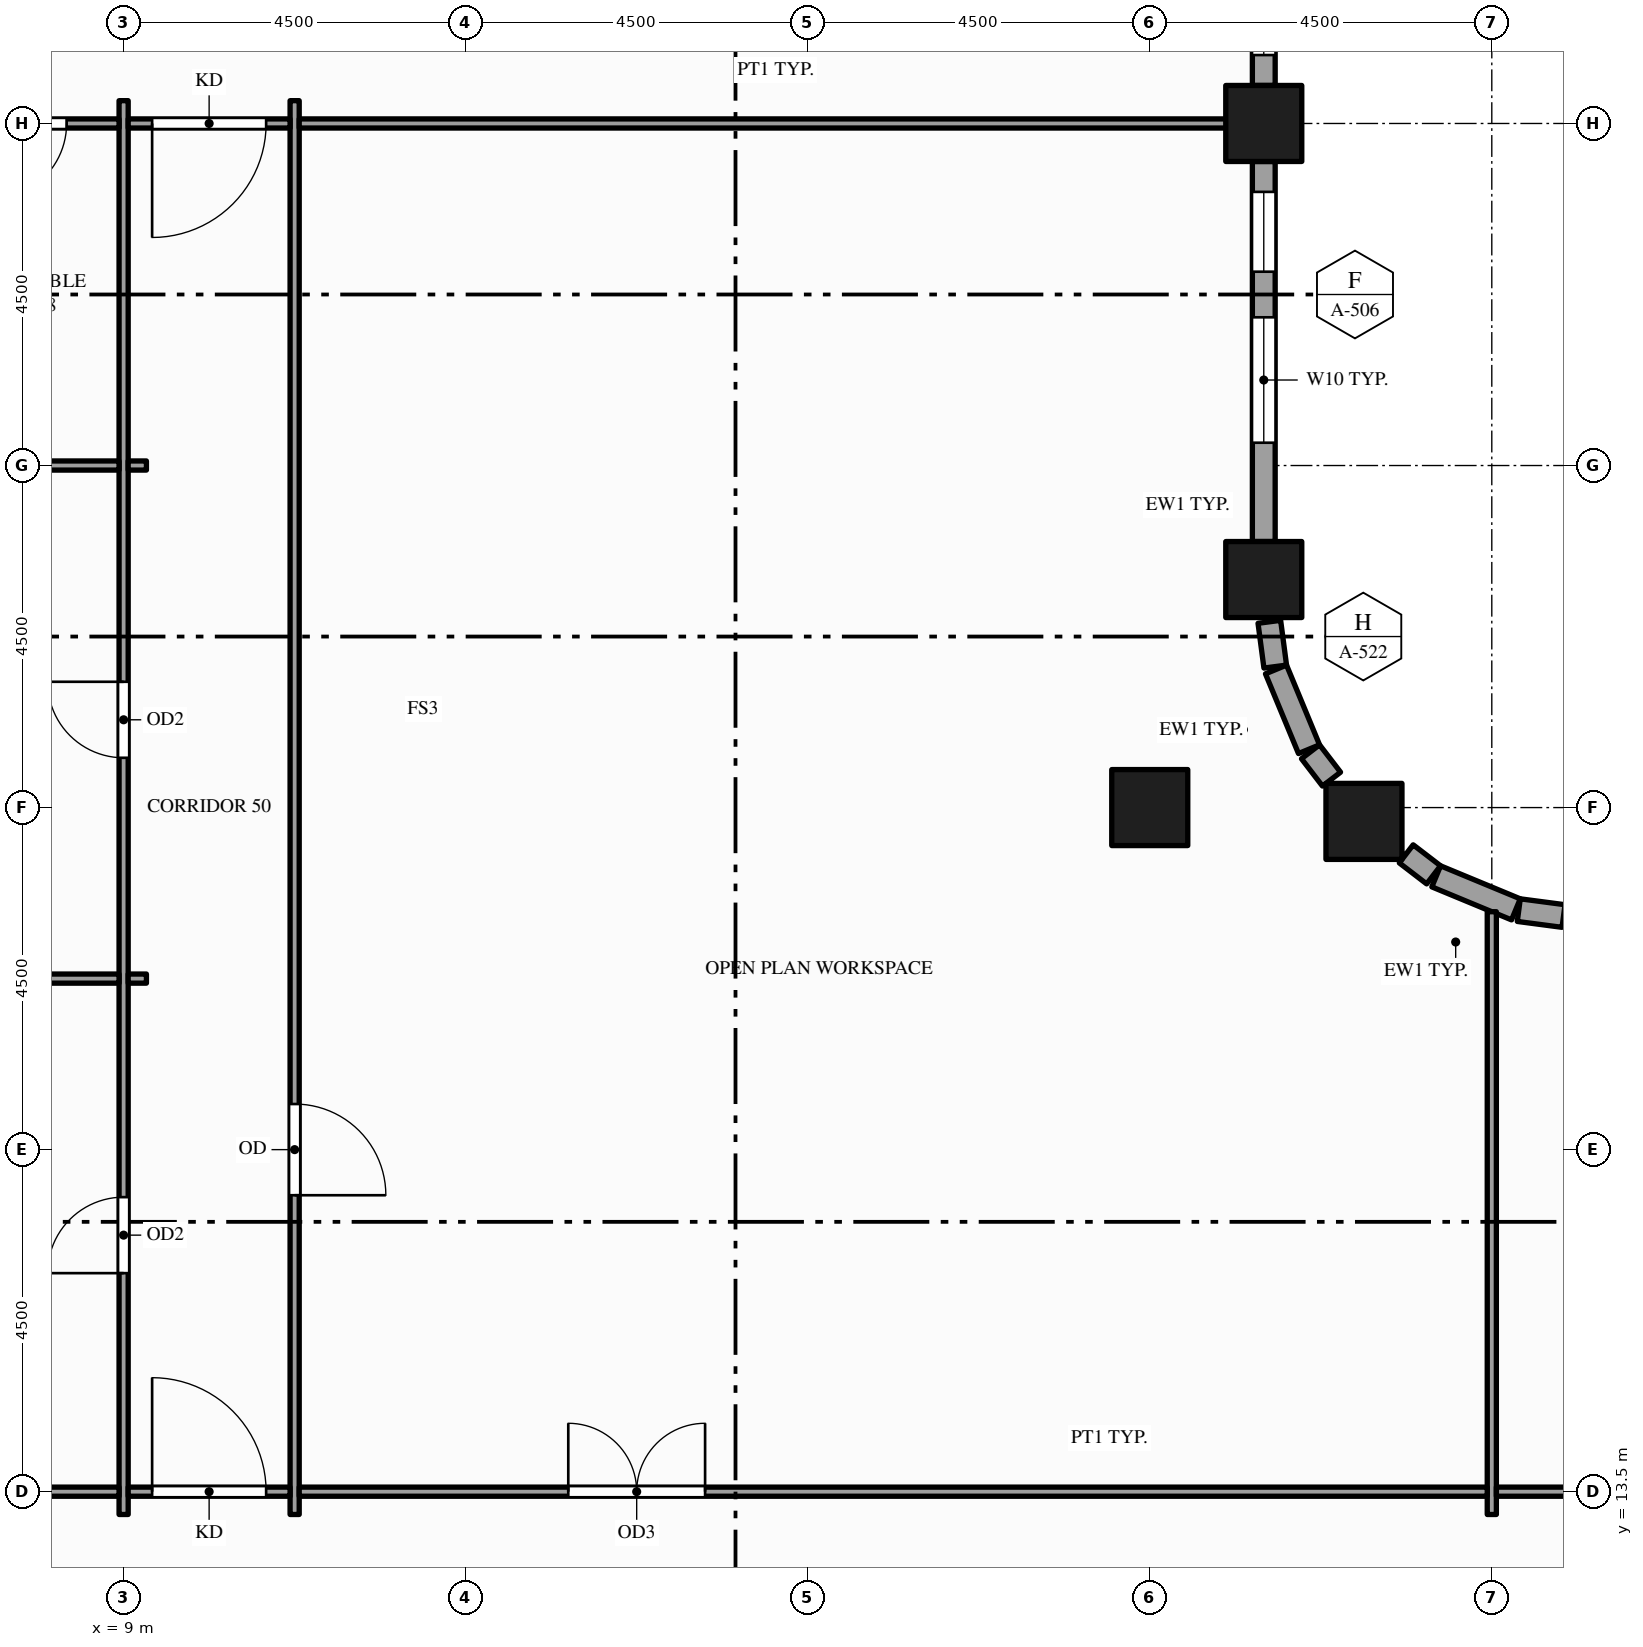
"""IFC4 building model, lengths in metres.
Left out: names, types, materials, properties, quantities, classifications, styles, units other than length and angle.
Written with IfcOpenShell. Run it as: python <this file> out.ifc"""

import sys

from ifc_helpers import new_model, si_unit, direction, frame, frame_2d, origin, origin_2d, place, context, subcontext, project, spatial, rectangle, hollow_rectangle, extrude, element, fill, save


model = new_model("IFC4")
c1 = context("Model", 3, precision=1e-05, world=origin(), true_north=direction((0.0, 1.0)))
c2 = subcontext(c1, "Body", "Model", "MODEL_VIEW")
j1 = project(units=[si_unit("LENGTHUNIT", "METRE"), si_unit("PLANEANGLEUNIT", "RADIAN")], contexts=[c1])
p1 = place(None, origin())
s1 = spatial("IfcSite", under=j1, at=p1, CompositionType="ELEMENT")
p2 = place(p1, origin())
s2 = spatial("IfcBuilding", under=s1, at=p2, CompositionType="ELEMENT")
p3 = place(p2, frame((0.0, 0.0, 123.0)))
s3 = spatial("IfcBuildingStorey", under=s2, at=p3, CompositionType="ELEMENT", Elevation=123.0)
for number, where, z_axis, x_axis in (
    (1, (22.5, 22.5, -0.15), (0.0, 0.0, 1.0), (1.0, 0.0, 0.0)),
    (2, (24.0, 25.5, -0.15), (0.0, 0.0, 1.0), (1.0, 0.0, 0.0)),
    (3, (24.0, 31.5, -0.15), (0.0, 0.0, 1.0), (1.0, 0.0, 0.0)),
    (4, (25.318, 22.318, -0.15), (0.0, 0.0, 1.0), (1.0, 0.0, 0.0)),
):
    element("IfcColumn", number, at=place(p3, frame(where, z_axis=z_axis, x_axis=x_axis)), inside=s3, PredefinedType="COLUMN", context=c2, shape_type="SweptSolid", body=[
        extrude(hollow_rectangle(XDim=1.0, YDim=1.0, WallThickness=0.05, at=origin_2d()), origin(), (0.0, 0.0, 1.0), 4.0),
    ])
p4 = place(p3, frame((27.944, 21.073, 0.0), z_axis=(0.0, 0.0, 1.0), x_axis=(-0.991420685839, 0.130709692412, 0.0)))
e5 = element("IfcWall", 5, at=p4, inside=s3, PredefinedType="STANDARD", context=c2, shape_type="SweptSolid", body=[
    extrude(rectangle(XDim=0.594, YDim=0.3, at=frame_2d((0.297, 0.0))), origin(), (0.0, 0.0, 1.0), 3.154),
])
p5 = place(p3, frame((27.317, 21.161, 0.0), z_axis=(0.0, 0.0, 1.0), x_axis=(-0.923914616768, 0.382598720491, 0.0)))
e6 = element("IfcWall", 6, at=p5, inside=s3, PredefinedType="STANDARD", context=c2, shape_type="SweptSolid", body=[
    extrude(rectangle(XDim=1.135, YDim=0.3, at=frame_2d((0.568, 0.0))), origin(), (0.0, 0.0, 1.0), 2.938),
])
p6 = place(p3, frame((26.234, 21.615, 0.0), z_axis=(0.0, 0.0, 1.0), x_axis=(-0.793563062559, 0.608488016104, 0.0)))
e7 = element("IfcWall", 7, at=p6, inside=s3, PredefinedType="STANDARD", context=c2, shape_type="SweptSolid", body=[
    extrude(rectangle(XDim=0.454, YDim=0.3, at=frame_2d((0.227, 0.0))), origin(), (0.0, 0.0, 1.0), 3.154),
])
p7 = place(p3, frame((24.891, 22.874, 0.0), z_axis=(0.0, 0.0, 1.0), x_axis=(-0.608488016104, 0.793563062559, 0.0)))
e8 = element("IfcWall", 8, at=p7, inside=s3, PredefinedType="STANDARD", context=c2, shape_type="SweptSolid", body=[
    extrude(rectangle(XDim=0.454, YDim=0.3, at=frame_2d((0.227, 0.0))), origin(), (0.0, 0.0, 1.0), 2.76),
])
p8 = place(p3, frame((24.595, 23.268, 0.0), z_axis=(0.0, 0.0, 1.0), x_axis=(-0.382598720491, 0.923914616768, 0.0)))
e9 = element("IfcWall", 9, at=p8, inside=s3, PredefinedType="STANDARD", context=c2, shape_type="SweptSolid", body=[
    extrude(rectangle(XDim=1.135, YDim=0.3, at=frame_2d((0.568, 0.0))), origin(), (0.0, 0.0, 1.0), 3.154),
])
p9 = place(p3, frame((24.151, 24.355, 0.0), z_axis=(0.0, 0.0, 1.0), x_axis=(-0.130709692412, 0.991420685839, 0.0)))
e10 = element("IfcWall", 10, at=p9, inside=s3, PredefinedType="STANDARD", context=c2, shape_type="SweptSolid", body=[
    extrude(rectangle(XDim=0.594, YDim=0.3, at=frame_2d((0.297, 0.0))), origin(), (0.0, 0.0, 1.0), 3.154),
])
p10 = place(p3, frame((24.0, 26.0, 0.0), z_axis=(0.0, 0.0, 1.0), x_axis=(0.0, 1.0, 0.0)))
e11 = element("IfcWall", 11, at=p10, inside=s3, PredefinedType="STANDARD", context=c2, shape_type="SweptSolid", body=[
    extrude(rectangle(XDim=5.0, YDim=0.3, at=frame_2d((2.5, 0.0))), origin(), (0.0, 0.0, 1.0), 3.154),
])
p11 = place(p10, frame((1.3, 0.0, 0.9)))
e12 = element("IfcOpeningElement", 12, at=p11, cuts=e11, PredefinedType="OPENING", context=c2, shape_type="SweptSolid", body=[
    extrude(rectangle(XDim=1.65, YDim=2.0, at=frame_2d((0.825, 1.0))), frame((0.0, 0.16, 0.0), z_axis=(0.0, -1.0, 0.0), x_axis=(1.0, 0.0, 0.0)), (0.0, 0.0, 1.0), 0.32),
])
p12 = place(p10, frame((3.55, 0.0, 0.9)))
e13 = element("IfcOpeningElement", 13, at=p12, cuts=e11, PredefinedType="OPENING", context=c2, shape_type="SweptSolid", body=[
    extrude(rectangle(XDim=1.05, YDim=2.0, at=frame_2d((0.525, 1.0))), frame((0.0, 0.16, 0.0), z_axis=(0.0, -1.0, 0.0), x_axis=(1.0, 0.0, 0.0)), (0.0, 0.0, 1.0), 0.32),
])
p13 = place(p3, frame((24.0, 32.0, 0.0), z_axis=(0.0, 0.0, 1.0), x_axis=(0.0, 1.0, 0.0)))
e14 = element("IfcWall", 14, at=p13, inside=s3, PredefinedType="STANDARD", context=c2, shape_type="SweptSolid", body=[
    extrude(rectangle(XDim=3.5, YDim=0.3, at=frame_2d((1.75, 0.0))), origin(), (0.0, 0.0, 1.0), 3.154),
])
p14 = place(p13, frame((0.4, 0.0, 0.9)))
e15 = element("IfcOpeningElement", 15, at=p14, cuts=e14, PredefinedType="OPENING", context=c2, shape_type="SweptSolid", body=[
    extrude(rectangle(XDim=1.05, YDim=2.0, at=frame_2d((0.525, 1.0))), frame((0.0, 0.16, 0.0), z_axis=(0.0, -1.0, 0.0), x_axis=(1.0, 0.0, 0.0)), (0.0, 0.0, 1.0), 0.32),
])
p15 = place(p13, frame((2.05, 0.0, 0.9)))
e16 = element("IfcOpeningElement", 16, at=p15, cuts=e14, PredefinedType="OPENING", context=c2, shape_type="SweptSolid", body=[
    extrude(rectangle(XDim=1.05, YDim=2.0, at=frame_2d((0.525, 1.0))), frame((0.0, 0.16, 0.0), z_axis=(0.0, -1.0, 0.0), x_axis=(1.0, 0.0, 0.0)), (0.0, 0.0, 1.0), 0.32),
])
p16 = place(p3, frame((9.0, 13.2, 0.0), z_axis=(0.0, 0.0, 1.0), x_axis=(0.0, 1.0, 0.0)))
e17 = element("IfcWall", 17, at=p16, inside=s3, PredefinedType="PARTITIONING", context=c2, shape_type="SweptSolid", body=[
    extrude(rectangle(XDim=18.6, YDim=0.12, at=frame_2d((9.3, 0.0))), origin(), (0.0, 0.0, 1.0), 2.6),
])
p17 = place(p16, frame((3.175, 0.0, 0.0)))
e18 = element("IfcOpeningElement", 18, at=p17, cuts=e17, PredefinedType="OPENING", context=c2, shape_type="SweptSolid", body=[
    extrude(rectangle(XDim=1.0, YDim=2.1, at=frame_2d((0.5, 1.05))), frame((0.0, 0.07, 0.0), z_axis=(0.0, -1.0, 0.0), x_axis=(1.0, 0.0, 0.0)), (0.0, 0.0, 1.0), 0.14),
])
p18 = place(p16, frame((9.955, 0.0, 0.0)))
e19 = element("IfcOpeningElement", 19, at=p18, cuts=e17, PredefinedType="OPENING", context=c2, shape_type="SweptSolid", body=[
    extrude(rectangle(XDim=1.0, YDim=2.1, at=frame_2d((0.5, 1.05))), frame((0.0, 0.07, 0.0), z_axis=(0.0, -1.0, 0.0), x_axis=(1.0, 0.0, 0.0)), (0.0, 0.0, 1.0), 0.14),
])
p19 = place(p3, frame((11.25, 13.2, 0.0), z_axis=(0.0, 0.0, 1.0), x_axis=(0.0, 1.0, 0.0)))
e20 = element("IfcWall", 20, at=p19, inside=s3, PredefinedType="PARTITIONING", context=c2, shape_type="SweptSolid", body=[
    extrude(rectangle(XDim=18.6, YDim=0.12, at=frame_2d((9.3, 0.0))), origin(), (0.0, 0.0, 1.0), 2.6),
])
p20 = place(p19, frame((4.2, 0.0, 0.0)))
e21 = element("IfcOpeningElement", 21, at=p20, cuts=e20, PredefinedType="OPENING", context=c2, shape_type="SweptSolid", body=[
    extrude(rectangle(XDim=1.2, YDim=2.1, at=frame_2d((0.6, 1.05))), frame((0.0, 0.07, 0.0), z_axis=(0.0, -1.0, 0.0), x_axis=(1.0, 0.0, 0.0)), (0.0, 0.0, 1.0), 0.14),
])
p21 = place(p3, frame((27.0, 13.2, 0.0), z_axis=(0.0, 0.0, 1.0), x_axis=(0.0, 1.0, 0.0)))
e22 = element("IfcWall", 22, at=p21, inside=s3, PredefinedType="PARTITIONING", context=c2, shape_type="SweptSolid", body=[
    extrude(rectangle(XDim=7.93, YDim=0.12, at=frame_2d((3.965, 0.0))), origin(), (0.0, 0.0, 1.0), 2.938),
])
p22 = place(p3, frame((0.15, 13.5, 0.0), z_axis=(0.0, 0.0, 1.0), x_axis=(1.0, 0.0, 0.0)))
e23 = element("IfcWall", 23, at=p22, inside=s3, PredefinedType="PARTITIONING", context=c2, shape_type="SweptSolid", body=[
    extrude(rectangle(XDim=8.79, YDim=0.12, at=frame_2d((4.395, 0.0))), origin(), (0.0, 0.0, 1.0), 2.938),
])
p23 = place(p3, frame((9.06, 13.5, 0.0), z_axis=(0.0, 0.0, 1.0), x_axis=(1.0, 0.0, 0.0)))
e24 = element("IfcWall", 24, at=p23, inside=s3, PredefinedType="PARTITIONING", context=c2, shape_type="SweptSolid", body=[
    extrude(rectangle(XDim=2.13, YDim=0.12, at=frame_2d((1.065, 0.0))), origin(), (0.0, 0.0, 1.0), 2.938),
])
p24 = place(p23, frame((0.315, 0.0, 0.0)))
e25 = element("IfcOpeningElement", 25, at=p24, cuts=e24, PredefinedType="OPENING", context=c2, shape_type="SweptSolid", body=[
    extrude(rectangle(XDim=1.5, YDim=2.1, at=frame_2d((0.75, 1.05))), frame((0.0, 0.07, 0.0), z_axis=(0.0, -1.0, 0.0), x_axis=(1.0, 0.0, 0.0)), (0.0, 0.0, 1.0), 0.14),
])
p25 = place(p3, frame((11.31, 13.5, 0.0), z_axis=(0.0, 0.0, 1.0), x_axis=(1.0, 0.0, 0.0)))
e26 = element("IfcWall", 26, at=p25, inside=s3, PredefinedType="PARTITIONING", context=c2, shape_type="SweptSolid", body=[
    extrude(rectangle(XDim=15.63, YDim=0.12, at=frame_2d((7.815, 0.0))), origin(), (0.0, 0.0, 1.0), 2.76),
])
p26 = place(p25, frame((3.54, 0.0, 0.0)))
e27 = element("IfcOpeningElement", 27, at=p26, cuts=e26, PredefinedType="OPENING", context=c2, shape_type="SweptSolid", body=[
    extrude(rectangle(XDim=1.8, YDim=2.1, at=frame_2d((0.9, 1.05))), frame((0.0, 0.07, 0.0), z_axis=(0.0, -1.0, 0.0), x_axis=(1.0, 0.0, 0.0)), (0.0, 0.0, 1.0), 0.14),
])
p27 = place(p3, frame((27.06, 13.5, 0.0), z_axis=(0.0, 0.0, 1.0), x_axis=(1.0, 0.0, 0.0)))
e28 = element("IfcWall", 28, at=p27, inside=s3, PredefinedType="PARTITIONING", context=c2, shape_type="SweptSolid", body=[
    extrude(rectangle(XDim=4.38, YDim=0.12, at=frame_2d((2.19, 0.0))), origin(), (0.0, 0.0, 1.0), 2.938),
])
p28 = place(p27, frame((1.74, 0.0, 0.0)))
e29 = element("IfcOpeningElement", 29, at=p28, cuts=e28, PredefinedType="OPENING", context=c2, shape_type="SweptSolid", body=[
    extrude(rectangle(XDim=0.9, YDim=2.1, at=frame_2d((0.45, 1.05))), frame((0.0, 0.07, 0.0), z_axis=(0.0, -1.0, 0.0), x_axis=(1.0, 0.0, 0.0)), (0.0, 0.0, 1.0), 0.14),
])
p29 = place(p3, frame((0.15, 20.25, 0.0), z_axis=(0.0, 0.0, 1.0), x_axis=(1.0, 0.0, 0.0)))
e30 = element("IfcWall", 30, at=p29, inside=s3, PredefinedType="PARTITIONING", context=c2, shape_type="SweptSolid", body=[
    extrude(rectangle(XDim=8.79, YDim=0.12, at=frame_2d((4.395, 0.0))), origin(), (0.0, 0.0, 1.0), 2.938),
])
p30 = place(p3, frame((9.06, 20.25, 0.0), z_axis=(0.0, 0.0, 1.0), x_axis=(1.0, 0.0, 0.0)))
e31 = element("IfcWall", 31, at=p30, inside=s3, PredefinedType="PARTITIONING", context=c2, shape_type="SweptSolid", body=[
    extrude(rectangle(XDim=0.24, YDim=0.12, at=frame_2d((0.12, 0.0))), origin(), (0.0, 0.0, 1.0), 2.938),
])
p31 = place(p3, frame((6.56, 27.0, 0.0), z_axis=(0.0, 0.0, 1.0), x_axis=(1.0, 0.0, 0.0)))
e32 = element("IfcWall", 32, at=p31, inside=s3, PredefinedType="PARTITIONING", context=c2, shape_type="SweptSolid", body=[
    extrude(rectangle(XDim=2.38, YDim=0.12, at=frame_2d((1.19, 0.0))), origin(), (0.0, 0.0, 1.0), 2.938),
])
p32 = place(p3, frame((9.06, 27.0, 0.0), z_axis=(0.0, 0.0, 1.0), x_axis=(1.0, 0.0, 0.0)))
e33 = element("IfcWall", 33, at=p32, inside=s3, PredefinedType="PARTITIONING", context=c2, shape_type="SweptSolid", body=[
    extrude(rectangle(XDim=0.24, YDim=0.12, at=frame_2d((0.12, 0.0))), origin(), (0.0, 0.0, 1.0), 2.938),
])
p33 = place(p3, frame((6.56, 31.5, 0.0), z_axis=(0.0, 0.0, 1.0), x_axis=(1.0, 0.0, 0.0)))
e34 = element("IfcWall", 34, at=p33, inside=s3, PredefinedType="PARTITIONING", context=c2, shape_type="SweptSolid", body=[
    extrude(rectangle(XDim=2.38, YDim=0.12, at=frame_2d((1.19, 0.0))), origin(), (0.0, 0.0, 1.0), 2.938),
])
p34 = place(p33, frame((0.69, 0.0, 0.0)))
e35 = element("IfcOpeningElement", 35, at=p34, cuts=e34, PredefinedType="OPENING", context=c2, shape_type="SweptSolid", body=[
    extrude(rectangle(XDim=1.0, YDim=2.1, at=frame_2d((0.5, 1.05))), frame((0.0, 0.07, 0.0), z_axis=(0.0, -1.0, 0.0), x_axis=(1.0, 0.0, 0.0)), (0.0, 0.0, 1.0), 0.14),
])
p35 = place(p3, frame((9.06, 31.5, 0.0), z_axis=(0.0, 0.0, 1.0), x_axis=(1.0, 0.0, 0.0)))
e36 = element("IfcWall", 36, at=p35, inside=s3, PredefinedType="PARTITIONING", context=c2, shape_type="SweptSolid", body=[
    extrude(rectangle(XDim=2.13, YDim=0.12, at=frame_2d((1.065, 0.0))), origin(), (0.0, 0.0, 1.0), 2.938),
])
p36 = place(p35, frame((0.315, 0.0, 0.0)))
e37 = element("IfcOpeningElement", 37, at=p36, cuts=e36, PredefinedType="OPENING", context=c2, shape_type="SweptSolid", body=[
    extrude(rectangle(XDim=1.5, YDim=2.1, at=frame_2d((0.75, 1.05))), frame((0.0, 0.07, 0.0), z_axis=(0.0, -1.0, 0.0), x_axis=(1.0, 0.0, 0.0)), (0.0, 0.0, 1.0), 0.14),
])
p37 = place(p3, frame((11.31, 31.5, 0.0), z_axis=(0.0, 0.0, 1.0), x_axis=(1.0, 0.0, 0.0)))
e38 = element("IfcWall", 38, at=p37, inside=s3, PredefinedType="PARTITIONING", context=c2, shape_type="SweptSolid", body=[
    extrude(rectangle(XDim=12.54, YDim=0.12, at=frame_2d((6.27, 0.0))), origin(), (0.0, 0.0, 1.0), 2.938),
])
p38 = place(p11, origin())
e39 = element("IfcWindow", 39, at=p38, inside=s3, PartitioningType="SINGLE_PANEL", PredefinedType="WINDOW", context=c2, shape_type="SweptSolid", body=[
    extrude(rectangle(XDim=1.65, YDim=2.0, at=frame_2d((0.825, 1.0))), frame((0.0, 0.03, 0.0), z_axis=(0.0, -1.0, 0.0), x_axis=(1.0, 0.0, 0.0)), (0.0, 0.0, 1.0), 0.06),
])
fill(e12, e39)
p39 = place(p12, origin())
e40 = element("IfcWindow", 40, at=p39, inside=s3, PartitioningType="SINGLE_PANEL", PredefinedType="WINDOW", context=c2, shape_type="SweptSolid", body=[
    extrude(rectangle(XDim=1.05, YDim=2.0, at=frame_2d((0.525, 1.0))), frame((0.0, 0.03, 0.0), z_axis=(0.0, -1.0, 0.0), x_axis=(1.0, 0.0, 0.0)), (0.0, 0.0, 1.0), 0.06),
])
fill(e13, e40)
p40 = place(p14, origin())
e41 = element("IfcWindow", 41, at=p40, inside=s3, PartitioningType="SINGLE_PANEL", PredefinedType="WINDOW", context=c2, shape_type="SweptSolid", body=[
    extrude(rectangle(XDim=1.05, YDim=2.0, at=frame_2d((0.525, 1.0))), frame((0.0, 0.03, 0.0), z_axis=(0.0, -1.0, 0.0), x_axis=(1.0, 0.0, 0.0)), (0.0, 0.0, 1.0), 0.06),
])
fill(e15, e41)
p41 = place(p26, origin())
e42 = element("IfcDoor", 42, at=p41, inside=s3, OperationType="DOUBLE_DOOR_SINGLE_SWING", PredefinedType="DOOR", context=c2, shape_type="SweptSolid", body=[
    extrude(rectangle(XDim=1.8, YDim=2.1, at=frame_2d((0.9, 1.05))), frame((0.0, 0.025, 0.0), z_axis=(0.0, -1.0, 0.0), x_axis=(1.0, 0.0, 0.0)), (0.0, 0.0, 1.0), 0.05),
])
fill(e27, e42)
p42 = place(p24, origin())
e43 = element("IfcDoor", 43, at=p42, inside=s3, OperationType="SINGLE_SWING_LEFT", PredefinedType="DOOR", context=c2, shape_type="SweptSolid", body=[
    extrude(rectangle(XDim=1.5, YDim=2.1, at=frame_2d((0.75, 1.05))), frame((0.0, 0.025, 0.0), z_axis=(0.0, -1.0, 0.0), x_axis=(1.0, 0.0, 0.0)), (0.0, 0.0, 1.0), 0.05),
])
fill(e25, e43)
p43 = place(p36, origin())
e44 = element("IfcDoor", 44, at=p43, inside=s3, OperationType="SINGLE_SWING_LEFT", PredefinedType="DOOR", context=c2, shape_type="SweptSolid", body=[
    extrude(rectangle(XDim=1.5, YDim=2.1, at=frame_2d((0.75, 1.05))), frame((0.0, 0.025, 0.0), z_axis=(0.0, -1.0, 0.0), x_axis=(1.0, 0.0, 0.0)), (0.0, 0.0, 1.0), 0.05),
])
fill(e37, e44)
p44 = place(p17, origin())
e45 = element("IfcDoor", 45, at=p44, inside=s3, OperationType="SINGLE_SWING_LEFT", PredefinedType="DOOR", context=c2, shape_type="SweptSolid", body=[
    extrude(rectangle(XDim=1.0, YDim=2.1, at=frame_2d((0.5, 1.05))), frame((0.0, 0.025, 0.0), z_axis=(0.0, -1.0, 0.0), x_axis=(1.0, 0.0, 0.0)), (0.0, 0.0, 1.0), 0.05),
])
fill(e18, e45)
p45 = place(p18, origin())
e46 = element("IfcDoor", 46, at=p45, inside=s3, OperationType="SINGLE_SWING_RIGHT", PredefinedType="DOOR", context=c2, shape_type="SweptSolid", body=[
    extrude(rectangle(XDim=1.0, YDim=2.1, at=frame_2d((0.5, 1.05))), frame((0.0, 0.025, 0.0), z_axis=(0.0, -1.0, 0.0), x_axis=(1.0, 0.0, 0.0)), (0.0, 0.0, 1.0), 0.05),
])
fill(e19, e46)
p46 = place(p34, origin())
e47 = element("IfcDoor", 47, at=p46, inside=s3, OperationType="SINGLE_SWING_LEFT", PredefinedType="DOOR", context=c2, shape_type="SweptSolid", body=[
    extrude(rectangle(XDim=1.0, YDim=2.1, at=frame_2d((0.5, 1.05))), frame((0.0, 0.025, 0.0), z_axis=(0.0, -1.0, 0.0), x_axis=(1.0, 0.0, 0.0)), (0.0, 0.0, 1.0), 0.05),
])
fill(e35, e47)
p47 = place(p20, origin())
e48 = element("IfcDoor", 48, at=p47, inside=s3, OperationType="SINGLE_SWING_LEFT", PredefinedType="DOOR", context=c2, shape_type="SweptSolid", body=[
    extrude(rectangle(XDim=1.2, YDim=2.1, at=frame_2d((0.6, 1.05))), frame((0.0, 0.025, 0.0), z_axis=(0.0, -1.0, 0.0), x_axis=(1.0, 0.0, 0.0)), (0.0, 0.0, 1.0), 0.05),
])
fill(e21, e48)
save(model, sys.argv[1])
